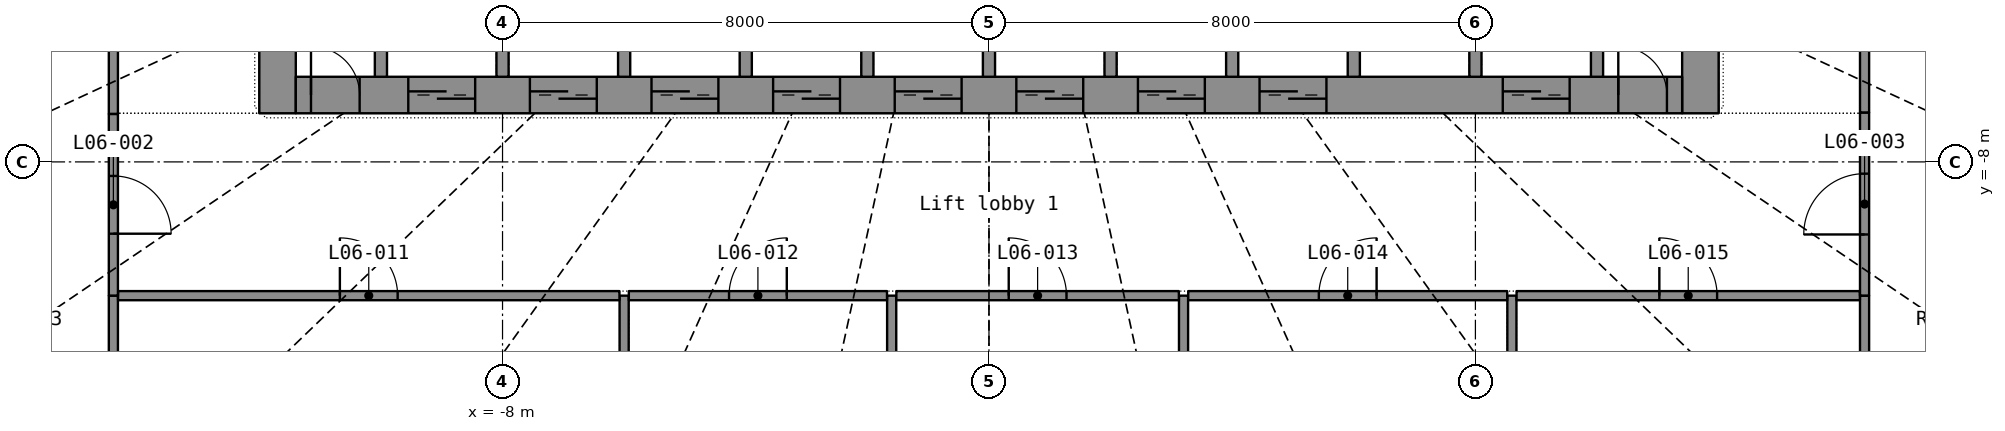
"""IFC4 building model, lengths in metres.
Left out: names, types, materials, properties, quantities, classifications, styles, units other than length and angle.
Written with IfcOpenShell. Run it as: python <this file> out.ifc"""

import sys

from ifc_helpers import new_model, si_unit, direction, frame, frame_2d, origin, place, context, subcontext, project, spatial, rectangle, extrude, element, fill, save


model = new_model("IFC4")
c1 = context("Model", 3, precision=1e-05, world=origin(), true_north=direction((0.0, 1.0)))
c2 = subcontext(c1, "Body", "Model", "MODEL_VIEW")
j1 = project(units=[si_unit("LENGTHUNIT", "METRE"), si_unit("PLANEANGLEUNIT", "RADIAN")], contexts=[c1])
p1 = place(None, origin())
s1 = spatial("IfcSite", under=j1, at=p1, CompositionType="ELEMENT")
p2 = place(p1, origin())
s2 = spatial("IfcBuilding", under=s1, at=p2, CompositionType="ELEMENT")
p3 = place(p2, frame((0.0, 0.0, 32.9)))
s3 = spatial("IfcBuildingStorey", under=s2, at=p3, CompositionType="ELEMENT", Elevation=32.9)
p4 = place(p3, frame((-11.7, -7.2, 0.0), z_axis=(0.0, 0.0, 1.0), x_axis=(0.0, 1.0, 0.0)))
e1 = element("IfcWall", 1, at=p4, inside=s3, PredefinedType="SHEAR", context=c2, shape_type="SweptSolid", body=[
    extrude(rectangle(XDim=14.4, YDim=0.6, at=frame_2d((7.2, 0.0))), origin(), (0.0, 0.0, 1.0), 3.8),
])
p5 = place(p4, frame((6.5, 0.0, 0.0)))
e2 = element("IfcOpeningElement", 2, at=p5, cuts=e1, PredefinedType="OPENING", context=c2, shape_type="SweptSolid", body=[
    extrude(rectangle(XDim=1.4, YDim=2.2, at=frame_2d((0.7, 1.1))), frame((0.0, 0.31, 0.0), z_axis=(0.0, -1.0, 0.0), x_axis=(1.0, 0.0, 0.0)), (0.0, 0.0, 1.0), 0.62),
])
p6 = place(p3, frame((11.7, -7.2, 0.0), z_axis=(0.0, 0.0, 1.0), x_axis=(0.0, 1.0, 0.0)))
e3 = element("IfcWall", 3, at=p6, inside=s3, PredefinedType="SHEAR", context=c2, shape_type="SweptSolid", body=[
    extrude(rectangle(XDim=14.4, YDim=0.6, at=frame_2d((7.2, 0.0))), origin(), (0.0, 0.0, 1.0), 3.8),
])
p7 = place(p6, frame((6.5, 0.0, 0.0)))
e4 = element("IfcOpeningElement", 4, at=p7, cuts=e3, PredefinedType="OPENING", context=c2, shape_type="SweptSolid", body=[
    extrude(rectangle(XDim=1.4, YDim=2.2, at=frame_2d((0.7, 1.1))), frame((0.0, 0.31, 0.0), z_axis=(0.0, -1.0, 0.0), x_axis=(1.0, 0.0, 0.0)), (0.0, 0.0, 1.0), 0.62),
])
p8 = place(p3, frame((-11.4, -6.9, 0.0), z_axis=(0.0, 0.0, 1.0), x_axis=(1.0, 0.0, 0.0)))
e5 = element("IfcWall", 5, at=p8, inside=s3, PredefinedType="SHEAR", context=c2, shape_type="SweptSolid", body=[
    extrude(rectangle(XDim=22.8, YDim=0.6, at=frame_2d((11.4, 0.0))), origin(), (0.0, 0.0, 1.0), 3.8),
])
p9 = place(p8, frame((1.85, 0.0, 0.0)))
e6 = element("IfcOpeningElement", 6, at=p9, cuts=e5, PredefinedType="OPENING", context=c2, shape_type="SweptSolid", body=[
    extrude(rectangle(XDim=1.1, YDim=2.2, at=frame_2d((0.55, 1.1))), frame((0.0, 0.31, 0.0), z_axis=(0.0, -1.0, 0.0), x_axis=(1.0, 0.0, 0.0)), (0.0, 0.0, 1.0), 0.62),
])
p10 = place(p8, frame((3.85, 0.0, 0.0)))
e7 = element("IfcOpeningElement", 7, at=p10, cuts=e5, PredefinedType="OPENING", context=c2, shape_type="SweptSolid", body=[
    extrude(rectangle(XDim=1.1, YDim=2.2, at=frame_2d((0.55, 1.1))), frame((0.0, 0.31, 0.0), z_axis=(0.0, -1.0, 0.0), x_axis=(1.0, 0.0, 0.0)), (0.0, 0.0, 1.0), 0.62),
])
p11 = place(p8, frame((5.85, 0.0, 0.0)))
e8 = element("IfcOpeningElement", 8, at=p11, cuts=e5, PredefinedType="OPENING", context=c2, shape_type="SweptSolid", body=[
    extrude(rectangle(XDim=1.1, YDim=2.2, at=frame_2d((0.55, 1.1))), frame((0.0, 0.31, 0.0), z_axis=(0.0, -1.0, 0.0), x_axis=(1.0, 0.0, 0.0)), (0.0, 0.0, 1.0), 0.62),
])
p12 = place(p8, frame((7.85, 0.0, 0.0)))
e9 = element("IfcOpeningElement", 9, at=p12, cuts=e5, PredefinedType="OPENING", context=c2, shape_type="SweptSolid", body=[
    extrude(rectangle(XDim=1.1, YDim=2.2, at=frame_2d((0.55, 1.1))), frame((0.0, 0.31, 0.0), z_axis=(0.0, -1.0, 0.0), x_axis=(1.0, 0.0, 0.0)), (0.0, 0.0, 1.0), 0.62),
])
p13 = place(p8, frame((9.85, 0.0, 0.0)))
e10 = element("IfcOpeningElement", 10, at=p13, cuts=e5, PredefinedType="OPENING", context=c2, shape_type="SweptSolid", body=[
    extrude(rectangle(XDim=1.1, YDim=2.2, at=frame_2d((0.55, 1.1))), frame((0.0, 0.31, 0.0), z_axis=(0.0, -1.0, 0.0), x_axis=(1.0, 0.0, 0.0)), (0.0, 0.0, 1.0), 0.62),
])
p14 = place(p8, frame((11.85, 0.0, 0.0)))
e11 = element("IfcOpeningElement", 11, at=p14, cuts=e5, PredefinedType="OPENING", context=c2, shape_type="SweptSolid", body=[
    extrude(rectangle(XDim=1.1, YDim=2.2, at=frame_2d((0.55, 1.1))), frame((0.0, 0.31, 0.0), z_axis=(0.0, -1.0, 0.0), x_axis=(1.0, 0.0, 0.0)), (0.0, 0.0, 1.0), 0.62),
])
p15 = place(p8, frame((13.85, 0.0, 0.0)))
e12 = element("IfcOpeningElement", 12, at=p15, cuts=e5, PredefinedType="OPENING", context=c2, shape_type="SweptSolid", body=[
    extrude(rectangle(XDim=1.1, YDim=2.2, at=frame_2d((0.55, 1.1))), frame((0.0, 0.31, 0.0), z_axis=(0.0, -1.0, 0.0), x_axis=(1.0, 0.0, 0.0)), (0.0, 0.0, 1.0), 0.62),
])
p16 = place(p8, frame((15.85, 0.0, 0.0)))
e13 = element("IfcOpeningElement", 13, at=p16, cuts=e5, PredefinedType="OPENING", context=c2, shape_type="SweptSolid", body=[
    extrude(rectangle(XDim=1.1, YDim=2.2, at=frame_2d((0.55, 1.1))), frame((0.0, 0.31, 0.0), z_axis=(0.0, -1.0, 0.0), x_axis=(1.0, 0.0, 0.0)), (0.0, 0.0, 1.0), 0.62),
])
p17 = place(p8, frame((19.85, 0.0, 0.0)))
e14 = element("IfcOpeningElement", 14, at=p17, cuts=e5, PredefinedType="OPENING", context=c2, shape_type="SweptSolid", body=[
    extrude(rectangle(XDim=1.1, YDim=2.2, at=frame_2d((0.55, 1.1))), frame((0.0, 0.31, 0.0), z_axis=(0.0, -1.0, 0.0), x_axis=(1.0, 0.0, 0.0)), (0.0, 0.0, 1.0), 0.62),
])
p18 = place(p8, frame((0.25, 0.0, 0.0)))
e15 = element("IfcOpeningElement", 15, at=p18, cuts=e5, PredefinedType="OPENING", context=c2, shape_type="SweptSolid", body=[
    extrude(rectangle(XDim=0.8, YDim=2.05, at=frame_2d((0.4, 1.025))), frame((0.0, 0.31, 0.0), z_axis=(0.0, -1.0, 0.0), x_axis=(1.0, 0.0, 0.0)), (0.0, 0.0, 1.0), 0.62),
])
p19 = place(p8, frame((21.75, 0.0, 0.0)))
e16 = element("IfcOpeningElement", 16, at=p19, cuts=e5, PredefinedType="OPENING", context=c2, shape_type="SweptSolid", body=[
    extrude(rectangle(XDim=0.8, YDim=2.05, at=frame_2d((0.4, 1.025))), frame((0.0, 0.31, 0.0), z_axis=(0.0, -1.0, 0.0), x_axis=(1.0, 0.0, 0.0)), (0.0, 0.0, 1.0), 0.62),
])
for number, where, z_axis, x_axis in (
    (17, (-10.0, -6.6, 0.0), (0.0, 0.0, 1.0), (0.0, 1.0, 0.0)),
    (18, (-8.0, -6.6, 0.0), (0.0, 0.0, 1.0), (0.0, 1.0, 0.0)),
    (19, (-6.0, -6.6, 0.0), (0.0, 0.0, 1.0), (0.0, 1.0, 0.0)),
    (20, (-4.0, -6.6, 0.0), (0.0, 0.0, 1.0), (0.0, 1.0, 0.0)),
    (21, (-2.0, -6.6, 0.0), (0.0, 0.0, 1.0), (0.0, 1.0, 0.0)),
    (22, (0.0, -6.6, 0.0), (0.0, 0.0, 1.0), (0.0, 1.0, 0.0)),
    (23, (2.0, -6.6, 0.0), (0.0, 0.0, 1.0), (0.0, 1.0, 0.0)),
    (24, (4.0, -6.6, 0.0), (0.0, 0.0, 1.0), (0.0, 1.0, 0.0)),
    (25, (6.0, -6.6, 0.0), (0.0, 0.0, 1.0), (0.0, 1.0, 0.0)),
    (26, (8.0, -6.6, 0.0), (0.0, 0.0, 1.0), (0.0, 1.0, 0.0)),
    (27, (10.0, -6.6, 0.0), (0.0, 0.0, 1.0), (0.0, 1.0, 0.0)),
):
    element("IfcWall", number, at=place(p3, frame(where, z_axis=z_axis, x_axis=x_axis)), inside=s3, PredefinedType="SHEAR", context=c2, shape_type="SweptSolid", body=[
        extrude(rectangle(XDim=2.7, YDim=0.2, at=frame_2d((1.35, 0.0))), origin(), (0.0, 0.0, 1.0), 3.8),
    ])
p20 = place(p3, frame((-14.4, 7.212, 0.0), z_axis=(0.0, 0.0, 1.0), x_axis=(0.0, -1.0, 0.0)))
e28 = element("IfcWall", 28, at=p20, inside=s3, PredefinedType="PARTITIONING", context=c2, shape_type="SweptSolid", body=[
    extrude(rectangle(XDim=14.424, YDim=0.15, at=frame_2d((7.212, 0.0))), origin(), (0.0, 0.0, 1.0), 2.8),
])
p21 = place(p20, frame((6.737, 0.0, 0.0)))
e29 = element("IfcOpeningElement", 29, at=p21, cuts=e28, PredefinedType="OPENING", context=c2, shape_type="SweptSolid", body=[
    extrude(rectangle(XDim=0.95, YDim=2.15, at=frame_2d((0.475, 1.075))), frame((0.0, 0.085, 0.0), z_axis=(0.0, -1.0, 0.0), x_axis=(1.0, 0.0, 0.0)), (0.0, 0.0, 1.0), 0.17),
])
p22 = place(p3, frame((-1.6, -23.093, 0.0), z_axis=(0.0, 0.0, 1.0), x_axis=(0.0, 1.0, 0.0)))
e30 = element("IfcWall", 30, at=p22, inside=s3, PredefinedType="PARTITIONING", context=c2, shape_type="SweptSolid", body=[
    extrude(rectangle(XDim=12.893, YDim=0.15, at=frame_2d((6.447, 0.0))), origin(), (0.0, 0.0, 1.0), 2.8),
])
p23 = place(p3, frame((3.2, -22.979, 0.0), z_axis=(0.0, 0.0, 1.0), x_axis=(0.0, 1.0, 0.0)))
e31 = element("IfcWall", 31, at=p23, inside=s3, PredefinedType="PARTITIONING", context=c2, shape_type="SweptSolid", body=[
    extrude(rectangle(XDim=12.779, YDim=0.15, at=frame_2d((6.389, 0.0))), origin(), (0.0, 0.0, 1.0), 2.8),
])
p24 = place(p3, frame((-6.0, -22.619, 0.0), z_axis=(0.0, 0.0, 1.0), x_axis=(0.0, 1.0, 0.0)))
e32 = element("IfcWall", 32, at=p24, inside=s3, PredefinedType="PARTITIONING", context=c2, shape_type="SweptSolid", body=[
    extrude(rectangle(XDim=12.419, YDim=0.15, at=frame_2d((6.209, 0.0))), origin(), (0.0, 0.0, 1.0), 2.8),
])
p25 = place(p3, frame((8.6, -22.052, 0.0), z_axis=(0.0, 0.0, 1.0), x_axis=(0.0, 1.0, 0.0)))
e33 = element("IfcWall", 33, at=p25, inside=s3, PredefinedType="PARTITIONING", context=c2, shape_type="SweptSolid", body=[
    extrude(rectangle(XDim=11.852, YDim=0.15, at=frame_2d((5.926, 0.0))), origin(), (0.0, 0.0, 1.0), 2.8),
])
for number, where, z_axis, x_axis in (
    (34, (-14.4, -20.033, 0.0), (0.0, 0.0, 1.0), (0.0, 1.0, 0.0)),
    (35, (14.4, -10.2, 0.0), (0.0, 0.0, 1.0), (0.0, -1.0, 0.0)),
):
    element("IfcWall", number, at=place(p3, frame(where, z_axis=z_axis, x_axis=x_axis)), inside=s3, PredefinedType="PARTITIONING", context=c2, shape_type="SweptSolid", body=[
        extrude(rectangle(XDim=9.833, YDim=0.15, at=frame_2d((4.917, 0.0))), origin(), (0.0, 0.0, 1.0), 2.8),
    ])
p26 = place(p3, frame((-14.323, -10.2, 0.0), z_axis=(0.0, 0.0, 1.0), x_axis=(1.0, 0.0, 0.0)))
e36 = element("IfcWall", 36, at=p26, inside=s3, PredefinedType="PARTITIONING", context=c2, shape_type="SweptSolid", body=[
    extrude(rectangle(XDim=8.246, YDim=0.15, at=frame_2d((4.123, 0.0))), origin(), (0.0, 0.0, 1.0), 2.8),
])
p27 = place(p26, frame((3.648, 0.0, 0.0)))
e37 = element("IfcOpeningElement", 37, at=p27, cuts=e36, PredefinedType="OPENING", context=c2, shape_type="SweptSolid", body=[
    extrude(rectangle(XDim=0.95, YDim=2.15, at=frame_2d((0.475, 1.075))), frame((0.0, 0.085, 0.0), z_axis=(0.0, -1.0, 0.0), x_axis=(1.0, 0.0, 0.0)), (0.0, 0.0, 1.0), 0.17),
])
p28 = place(p3, frame((8.677, -10.2, 0.0), z_axis=(0.0, 0.0, 1.0), x_axis=(1.0, 0.0, 0.0)))
e38 = element("IfcWall", 38, at=p28, inside=s3, PredefinedType="PARTITIONING", context=c2, shape_type="SweptSolid", body=[
    extrude(rectangle(XDim=5.646, YDim=0.15, at=frame_2d((2.823, 0.0))), origin(), (0.0, 0.0, 1.0), 2.8),
])
p29 = place(p28, frame((2.348, 0.0, 0.0)))
e39 = element("IfcOpeningElement", 39, at=p29, cuts=e38, PredefinedType="OPENING", context=c2, shape_type="SweptSolid", body=[
    extrude(rectangle(XDim=0.95, YDim=2.15, at=frame_2d((0.475, 1.075))), frame((0.0, 0.085, 0.0), z_axis=(0.0, -1.0, 0.0), x_axis=(1.0, 0.0, 0.0)), (0.0, 0.0, 1.0), 0.17),
])
p30 = place(p3, frame((3.277, -10.2, 0.0), z_axis=(0.0, 0.0, 1.0), x_axis=(1.0, 0.0, 0.0)))
e40 = element("IfcWall", 40, at=p30, inside=s3, PredefinedType="PARTITIONING", context=c2, shape_type="SweptSolid", body=[
    extrude(rectangle(XDim=5.246, YDim=0.15, at=frame_2d((2.623, 0.0))), origin(), (0.0, 0.0, 1.0), 2.8),
])
p31 = place(p30, frame((2.148, 0.0, 0.0)))
e41 = element("IfcOpeningElement", 41, at=p31, cuts=e40, PredefinedType="OPENING", context=c2, shape_type="SweptSolid", body=[
    extrude(rectangle(XDim=0.95, YDim=2.15, at=frame_2d((0.475, 1.075))), frame((0.0, 0.085, 0.0), z_axis=(0.0, -1.0, 0.0), x_axis=(1.0, 0.0, 0.0)), (0.0, 0.0, 1.0), 0.17),
])
p32 = place(p3, frame((-1.523, -10.2, 0.0), z_axis=(0.0, 0.0, 1.0), x_axis=(1.0, 0.0, 0.0)))
e42 = element("IfcWall", 42, at=p32, inside=s3, PredefinedType="PARTITIONING", context=c2, shape_type="SweptSolid", body=[
    extrude(rectangle(XDim=4.646, YDim=0.15, at=frame_2d((2.323, 0.0))), origin(), (0.0, 0.0, 1.0), 2.8),
])
p33 = place(p32, frame((1.848, 0.0, 0.0)))
e43 = element("IfcOpeningElement", 43, at=p33, cuts=e42, PredefinedType="OPENING", context=c2, shape_type="SweptSolid", body=[
    extrude(rectangle(XDim=0.95, YDim=2.15, at=frame_2d((0.475, 1.075))), frame((0.0, 0.085, 0.0), z_axis=(0.0, -1.0, 0.0), x_axis=(1.0, 0.0, 0.0)), (0.0, 0.0, 1.0), 0.17),
])
p34 = place(p3, frame((-5.923, -10.2, 0.0), z_axis=(0.0, 0.0, 1.0), x_axis=(1.0, 0.0, 0.0)))
e44 = element("IfcWall", 44, at=p34, inside=s3, PredefinedType="PARTITIONING", context=c2, shape_type="SweptSolid", body=[
    extrude(rectangle(XDim=4.246, YDim=0.15, at=frame_2d((2.123, 0.0))), origin(), (0.0, 0.0, 1.0), 2.8),
])
p35 = place(p34, frame((1.648, 0.0, 0.0)))
e45 = element("IfcOpeningElement", 45, at=p35, cuts=e44, PredefinedType="OPENING", context=c2, shape_type="SweptSolid", body=[
    extrude(rectangle(XDim=0.95, YDim=2.15, at=frame_2d((0.475, 1.075))), frame((0.0, 0.085, 0.0), z_axis=(0.0, -1.0, 0.0), x_axis=(1.0, 0.0, 0.0)), (0.0, 0.0, 1.0), 0.17),
])
p36 = place(p3, frame((-14.4, -7.213, 0.0), z_axis=(0.0, 0.0, 1.0), x_axis=(0.0, -1.0, 0.0)))
e46 = element("IfcWall", 46, at=p36, inside=s3, PredefinedType="PARTITIONING", context=c2, shape_type="SweptSolid", body=[
    extrude(rectangle(XDim=2.986, YDim=0.15, at=frame_2d((1.493, 0.0))), origin(), (0.0, 0.0, 1.0), 2.8),
])
p37 = place(p36, frame((1.018, 0.0, 0.0)))
e47 = element("IfcOpeningElement", 47, at=p37, cuts=e46, PredefinedType="OPENING", context=c2, shape_type="SweptSolid", body=[
    extrude(rectangle(XDim=0.95, YDim=2.15, at=frame_2d((0.475, 1.075))), frame((0.0, 0.085, 0.0), z_axis=(0.0, -1.0, 0.0), x_axis=(1.0, 0.0, 0.0)), (0.0, 0.0, 1.0), 0.17),
])
p38 = place(p3, frame((14.4, -10.199, 0.0), z_axis=(0.0, 0.0, 1.0), x_axis=(0.0, 1.0, 0.0)))
e48 = element("IfcWall", 48, at=p38, inside=s3, PredefinedType="PARTITIONING", context=c2, shape_type="SweptSolid", body=[
    extrude(rectangle(XDim=3.011, YDim=0.15, at=frame_2d((1.505, 0.0))), origin(), (0.0, 0.0, 1.0), 2.8),
])
p39 = place(p38, frame((1.006, 0.0, 0.0)))
e49 = element("IfcOpeningElement", 49, at=p39, cuts=e48, PredefinedType="OPENING", context=c2, shape_type="SweptSolid", body=[
    extrude(rectangle(XDim=1.0, YDim=2.4, at=frame_2d((0.5, 1.2))), frame((0.0, 0.085, 0.0), z_axis=(0.0, -1.0, 0.0), x_axis=(1.0, 0.0, 0.0)), (0.0, 0.0, 1.0), 0.17),
])
p40 = place(p3, frame((14.4, -7.187, 0.0), z_axis=(0.0, 0.0, 1.0), x_axis=(0.0, 1.0, 0.0)))
e50 = element("IfcWall", 50, at=p40, inside=s3, PredefinedType="PARTITIONING", context=c2, shape_type="SweptSolid", body=[
    extrude(rectangle(XDim=1.11, YDim=0.15, at=frame_2d((0.555, 0.0))), origin(), (0.0, 0.0, 1.0), 2.8),
])
p41 = place(p9, origin())
e51 = element("IfcDoor", 51, at=p41, inside=s3, OperationType="DOUBLE_DOOR_SLIDING", PredefinedType="DOOR", context=c2, shape_type="SweptSolid", body=[
    extrude(rectangle(XDim=1.1, YDim=2.2, at=frame_2d((0.55, 1.1))), frame((0.0, 0.025, 0.0), z_axis=(0.0, -1.0, 0.0), x_axis=(1.0, 0.0, 0.0)), (0.0, 0.0, 1.0), 0.05),
])
fill(e6, e51)
p42 = place(p10, origin())
e52 = element("IfcDoor", 52, at=p42, inside=s3, OperationType="DOUBLE_DOOR_SLIDING", PredefinedType="DOOR", context=c2, shape_type="SweptSolid", body=[
    extrude(rectangle(XDim=1.1, YDim=2.2, at=frame_2d((0.55, 1.1))), frame((0.0, 0.025, 0.0), z_axis=(0.0, -1.0, 0.0), x_axis=(1.0, 0.0, 0.0)), (0.0, 0.0, 1.0), 0.05),
])
fill(e7, e52)
p43 = place(p11, origin())
e53 = element("IfcDoor", 53, at=p43, inside=s3, OperationType="DOUBLE_DOOR_SLIDING", PredefinedType="DOOR", context=c2, shape_type="SweptSolid", body=[
    extrude(rectangle(XDim=1.1, YDim=2.2, at=frame_2d((0.55, 1.1))), frame((0.0, 0.025, 0.0), z_axis=(0.0, -1.0, 0.0), x_axis=(1.0, 0.0, 0.0)), (0.0, 0.0, 1.0), 0.05),
])
fill(e8, e53)
p44 = place(p12, origin())
e54 = element("IfcDoor", 54, at=p44, inside=s3, OperationType="DOUBLE_DOOR_SLIDING", PredefinedType="DOOR", context=c2, shape_type="SweptSolid", body=[
    extrude(rectangle(XDim=1.1, YDim=2.2, at=frame_2d((0.55, 1.1))), frame((0.0, 0.025, 0.0), z_axis=(0.0, -1.0, 0.0), x_axis=(1.0, 0.0, 0.0)), (0.0, 0.0, 1.0), 0.05),
])
fill(e9, e54)
p45 = place(p13, origin())
e55 = element("IfcDoor", 55, at=p45, inside=s3, OperationType="DOUBLE_DOOR_SLIDING", PredefinedType="DOOR", context=c2, shape_type="SweptSolid", body=[
    extrude(rectangle(XDim=1.1, YDim=2.2, at=frame_2d((0.55, 1.1))), frame((0.0, 0.025, 0.0), z_axis=(0.0, -1.0, 0.0), x_axis=(1.0, 0.0, 0.0)), (0.0, 0.0, 1.0), 0.05),
])
fill(e10, e55)
p46 = place(p14, origin())
e56 = element("IfcDoor", 56, at=p46, inside=s3, OperationType="DOUBLE_DOOR_SLIDING", PredefinedType="DOOR", context=c2, shape_type="SweptSolid", body=[
    extrude(rectangle(XDim=1.1, YDim=2.2, at=frame_2d((0.55, 1.1))), frame((0.0, 0.025, 0.0), z_axis=(0.0, -1.0, 0.0), x_axis=(1.0, 0.0, 0.0)), (0.0, 0.0, 1.0), 0.05),
])
fill(e11, e56)
p47 = place(p15, origin())
e57 = element("IfcDoor", 57, at=p47, inside=s3, OperationType="DOUBLE_DOOR_SLIDING", PredefinedType="DOOR", context=c2, shape_type="SweptSolid", body=[
    extrude(rectangle(XDim=1.1, YDim=2.2, at=frame_2d((0.55, 1.1))), frame((0.0, 0.025, 0.0), z_axis=(0.0, -1.0, 0.0), x_axis=(1.0, 0.0, 0.0)), (0.0, 0.0, 1.0), 0.05),
])
fill(e12, e57)
p48 = place(p16, origin())
e58 = element("IfcDoor", 58, at=p48, inside=s3, OperationType="DOUBLE_DOOR_SLIDING", PredefinedType="DOOR", context=c2, shape_type="SweptSolid", body=[
    extrude(rectangle(XDim=1.1, YDim=2.2, at=frame_2d((0.55, 1.1))), frame((0.0, 0.025, 0.0), z_axis=(0.0, -1.0, 0.0), x_axis=(1.0, 0.0, 0.0)), (0.0, 0.0, 1.0), 0.05),
])
fill(e13, e58)
p49 = place(p17, origin())
e59 = element("IfcDoor", 59, at=p49, inside=s3, OperationType="DOUBLE_DOOR_SLIDING", PredefinedType="DOOR", context=c2, shape_type="SweptSolid", body=[
    extrude(rectangle(XDim=1.1, YDim=2.2, at=frame_2d((0.55, 1.1))), frame((0.0, 0.025, 0.0), z_axis=(0.0, -1.0, 0.0), x_axis=(1.0, 0.0, 0.0)), (0.0, 0.0, 1.0), 0.05),
])
fill(e14, e59)
p50 = place(p18, origin())
e60 = element("IfcDoor", 60, at=p50, inside=s3, OperationType="SINGLE_SWING_LEFT", PredefinedType="DOOR", context=c2, shape_type="SweptSolid", body=[
    extrude(rectangle(XDim=0.8, YDim=2.05, at=frame_2d((0.4, 1.025))), frame((0.0, 0.025, 0.0), z_axis=(0.0, -1.0, 0.0), x_axis=(1.0, 0.0, 0.0)), (0.0, 0.0, 1.0), 0.05),
])
fill(e15, e60)
p51 = place(p19, origin())
e61 = element("IfcDoor", 61, at=p51, inside=s3, OperationType="SINGLE_SWING_LEFT", PredefinedType="DOOR", context=c2, shape_type="SweptSolid", body=[
    extrude(rectangle(XDim=0.8, YDim=2.05, at=frame_2d((0.4, 1.025))), frame((0.0, 0.025, 0.0), z_axis=(0.0, -1.0, 0.0), x_axis=(1.0, 0.0, 0.0)), (0.0, 0.0, 1.0), 0.05),
])
fill(e16, e61)
p52 = place(p37, origin())
e62 = element("IfcDoor", 62, at=p52, inside=s3, OperationType="SINGLE_SWING_RIGHT", PredefinedType="DOOR", context=c2, shape_type="SweptSolid", body=[
    extrude(rectangle(XDim=0.95, YDim=2.15, at=frame_2d((0.475, 1.075))), frame((0.0, 0.025, 0.0), z_axis=(0.0, -1.0, 0.0), x_axis=(1.0, 0.0, 0.0)), (0.0, 0.0, 1.0), 0.05),
])
fill(e47, e62)
p53 = place(p39, origin())
e63 = element("IfcDoor", 63, at=p53, inside=s3, OperationType="SINGLE_SWING_LEFT", PredefinedType="DOOR", context=c2, shape_type="SweptSolid", body=[
    extrude(rectangle(XDim=1.0, YDim=2.4, at=frame_2d((0.5, 1.2))), frame((0.0, 0.025, 0.0), z_axis=(0.0, -1.0, 0.0), x_axis=(1.0, 0.0, 0.0)), (0.0, 0.0, 1.0), 0.05),
])
fill(e49, e63)
p54 = place(p27, origin())
e64 = element("IfcDoor", 64, at=p54, inside=s3, OperationType="SINGLE_SWING_LEFT", PredefinedType="DOOR", context=c2, shape_type="SweptSolid", body=[
    extrude(rectangle(XDim=0.95, YDim=2.15, at=frame_2d((0.475, 1.075))), frame((0.0, 0.025, 0.0), z_axis=(0.0, -1.0, 0.0), x_axis=(1.0, 0.0, 0.0)), (0.0, 0.0, 1.0), 0.05),
])
fill(e37, e64)
p55 = place(p35, origin())
e65 = element("IfcDoor", 65, at=p55, inside=s3, OperationType="SINGLE_SWING_RIGHT", PredefinedType="DOOR", context=c2, shape_type="SweptSolid", body=[
    extrude(rectangle(XDim=0.95, YDim=2.15, at=frame_2d((0.475, 1.075))), frame((0.0, 0.025, 0.0), z_axis=(0.0, -1.0, 0.0), x_axis=(1.0, 0.0, 0.0)), (0.0, 0.0, 1.0), 0.05),
])
fill(e45, e65)
p56 = place(p33, origin())
e66 = element("IfcDoor", 66, at=p56, inside=s3, OperationType="SINGLE_SWING_LEFT", PredefinedType="DOOR", context=c2, shape_type="SweptSolid", body=[
    extrude(rectangle(XDim=0.95, YDim=2.15, at=frame_2d((0.475, 1.075))), frame((0.0, 0.025, 0.0), z_axis=(0.0, -1.0, 0.0), x_axis=(1.0, 0.0, 0.0)), (0.0, 0.0, 1.0), 0.05),
])
fill(e43, e66)
p57 = place(p31, origin())
e67 = element("IfcDoor", 67, at=p57, inside=s3, OperationType="SINGLE_SWING_RIGHT", PredefinedType="DOOR", context=c2, shape_type="SweptSolid", body=[
    extrude(rectangle(XDim=0.95, YDim=2.15, at=frame_2d((0.475, 1.075))), frame((0.0, 0.025, 0.0), z_axis=(0.0, -1.0, 0.0), x_axis=(1.0, 0.0, 0.0)), (0.0, 0.0, 1.0), 0.05),
])
fill(e41, e67)
p58 = place(p29, origin())
e68 = element("IfcDoor", 68, at=p58, inside=s3, OperationType="SINGLE_SWING_LEFT", PredefinedType="DOOR", context=c2, shape_type="SweptSolid", body=[
    extrude(rectangle(XDim=0.95, YDim=2.15, at=frame_2d((0.475, 1.075))), frame((0.0, 0.025, 0.0), z_axis=(0.0, -1.0, 0.0), x_axis=(1.0, 0.0, 0.0)), (0.0, 0.0, 1.0), 0.05),
])
fill(e39, e68)
save(model, sys.argv[1])
